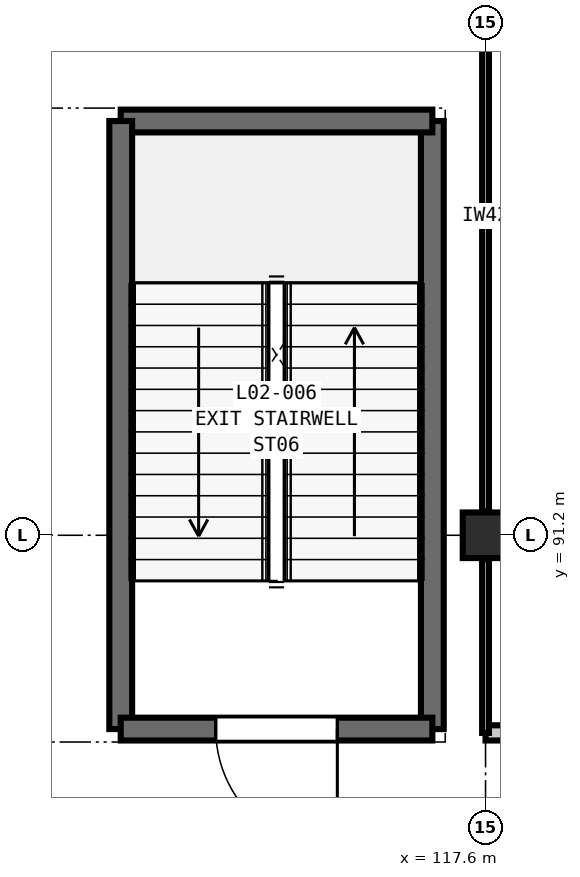
"""IFC4 building model, lengths in metres.
Left out: names, types, materials, properties, quantities, classifications, styles, units other than length and angle.
Written with IfcOpenShell. Run it as: python <this file> out.ifc"""

import sys

from ifc_helpers import new_model, si_unit, direction, frame, frame_2d, origin, origin_2d, place, context, subcontext, project, spatial, rectangle, extrude, element, fill, save


model = new_model("IFC4")
c1 = context("Model", 3, precision=1e-05, world=origin(), true_north=direction((0.0, 1.0)))
c2 = subcontext(c1, "Body", "Model", "MODEL_VIEW")
j1 = project(units=[si_unit("LENGTHUNIT", "METRE"), si_unit("PLANEANGLEUNIT", "RADIAN")], contexts=[c1])
p1 = place(None, origin())
s1 = spatial("IfcSite", under=j1, at=p1, CompositionType="ELEMENT")
p2 = place(p1, origin())
s2 = spatial("IfcBuilding", under=s1, at=p2, CompositionType="ELEMENT")
p3 = place(p2, frame((0.0, 0.0, 10.8)))
s3 = spatial("IfcBuildingStorey", under=s2, at=p3, CompositionType="ELEMENT", Elevation=10.8)
p4 = place(p3, frame((117.6, 91.2, 0.0), z_axis=(0.0, 0.0, 1.0), x_axis=(1.0, 0.0, 0.0)))
e1 = element("IfcColumn", 1, at=p4, inside=s3, PredefinedType="COLUMN", context=c2, shape_type="SweptSolid", body=[
    extrude(rectangle(XDim=0.6, YDim=0.6, at=origin_2d()), origin(), (0.0, 0.0, 1.0), 5.4),
])
p5 = place(p3, frame((116.9, 88.65, 0.0), z_axis=(0.0, 0.0, 1.0), x_axis=(0.0, 1.0, 0.0)))
e2 = element("IfcWall", 2, at=p5, inside=s3, PredefinedType="SHEAR", context=c2, shape_type="SweptSolid", body=[
    extrude(rectangle(XDim=8.0, YDim=0.3, at=frame_2d((4.0, 0.0))), origin(), (0.0, 0.0, 1.0), 5.4),
])
p6 = place(p3, frame((116.9, 96.65, 0.0), z_axis=(0.0, 0.0, 1.0), x_axis=(-1.0, 0.0, 0.0)))
e3 = element("IfcWall", 3, at=p6, inside=s3, PredefinedType="SHEAR", context=c2, shape_type="SweptSolid", body=[
    extrude(rectangle(XDim=4.1, YDim=0.3, at=frame_2d((2.05, 0.0))), origin(), (0.0, 0.0, 1.0), 5.4),
])
p7 = place(p3, frame((112.8, 96.65, 0.0), z_axis=(0.0, 0.0, 1.0), x_axis=(0.0, -1.0, 0.0)))
e4 = element("IfcWall", 4, at=p7, inside=s3, PredefinedType="SHEAR", context=c2, shape_type="SweptSolid", body=[
    extrude(rectangle(XDim=8.0, YDim=0.3, at=frame_2d((4.0, 0.0))), origin(), (0.0, 0.0, 1.0), 5.4),
])
p8 = place(p3, frame((112.8, 88.65, 0.0), z_axis=(0.0, 0.0, 1.0), x_axis=(1.0, 0.0, 0.0)))
e5 = element("IfcWall", 5, at=p8, inside=s3, PredefinedType="SHEAR", context=c2, shape_type="SweptSolid", body=[
    extrude(rectangle(XDim=4.1, YDim=0.3, at=frame_2d((2.05, 0.0))), origin(), (0.0, 0.0, 1.0), 5.4),
])
p9 = place(p8, frame((1.25, 0.0, 0.0)))
e6 = element("IfcOpeningElement", 6, at=p9, cuts=e5, PredefinedType="OPENING", context=c2, shape_type="SweptSolid", body=[
    extrude(rectangle(XDim=1.6, YDim=2.25, at=frame_2d((0.8, 1.125))), frame((0.0, 0.16, 0.0), z_axis=(0.0, -1.0, 0.0), x_axis=(1.0, 0.0, 0.0)), (0.0, 0.0, 1.0), 0.32),
])
p10 = place(p3, frame((117.6, 88.6, 0.0), z_axis=(0.0, 0.0, 1.0), x_axis=(1.0, 0.0, 0.0)))
e7 = element("IfcWall", 7, at=p10, inside=s3, PredefinedType="PARTITIONING", context=c2, shape_type="SweptSolid", body=[
    extrude(rectangle(XDim=8.4, YDim=0.2, at=frame_2d((4.2, 0.0))), origin(), (0.0, 0.0, 1.0), 5.07),
])
p11 = place(p10, frame((3.275, 0.0, 0.0)))
e8 = element("IfcOpeningElement", 8, at=p11, cuts=e7, PredefinedType="OPENING", context=c2, shape_type="SweptSolid", body=[
    extrude(rectangle(XDim=1.85, YDim=2.3, at=frame_2d((0.925, 1.15))), frame((0.0, 0.11, 0.0), z_axis=(0.0, -1.0, 0.0), x_axis=(1.0, 0.0, 0.0)), (0.0, 0.0, 1.0), 0.22),
])
p12 = place(p3, frame((117.6, 91.515, 0.0), z_axis=(0.0, 0.0, 1.0), x_axis=(0.0, 1.0, 0.0)))
e9 = element("IfcWall", 9, at=p12, inside=s3, PredefinedType="PARTITIONING", context=c2, shape_type="SweptSolid", body=[
    extrude(rectangle(XDim=7.77, YDim=0.09, at=frame_2d((3.885, 0.0))), origin(), (0.0, 0.0, 1.0), 4.735),
])
p13 = place(p3, frame((117.6, 88.6, 0.0), z_axis=(0.0, 0.0, 1.0), x_axis=(0.0, 1.0, 0.0)))
e10 = element("IfcWall", 10, at=p13, inside=s3, PredefinedType="PARTITIONING", context=c2, shape_type="SweptSolid", body=[
    extrude(rectangle(XDim=2.285, YDim=0.09, at=frame_2d((1.143, 0.0))), origin(), (0.0, 0.0, 1.0), 4.735),
])
p14 = place(p9, frame((1.6, 0.0, 0.0), z_axis=(0.0, 0.0, 1.0), x_axis=(-1.0, 0.0, 0.0)))
e11 = element("IfcDoor", 11, at=p14, inside=s3, OperationType="SINGLE_SWING_LEFT", PredefinedType="DOOR", context=c2, shape_type="SweptSolid", body=[
    extrude(rectangle(XDim=1.6, YDim=2.25, at=frame_2d((0.8, 1.125))), frame((0.0, 0.025, 0.0), z_axis=(0.0, -1.0, 0.0), x_axis=(1.0, 0.0, 0.0)), (0.0, 0.0, 1.0), 0.05),
])
fill(e6, e11)
save(model, sys.argv[1])
